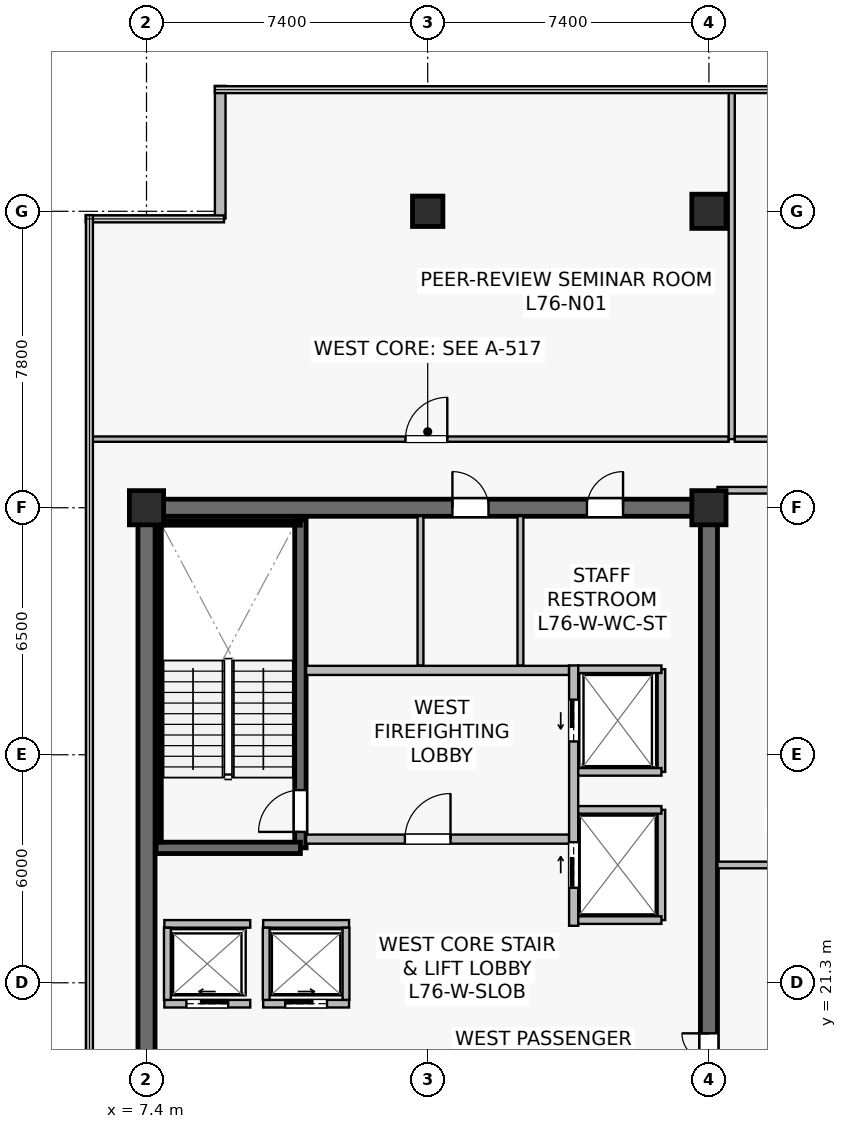
"""IFC4 building model, lengths in metres.
Left out: names, types, materials, properties, quantities, classifications, styles, units other than length and angle.
Written with IfcOpenShell. Run it as: python <this file> out.ifc"""

import sys

from ifc_helpers import new_model, si_unit, direction, frame, frame_2d, origin, origin_2d, place, context, subcontext, project, spatial, rectangle, extrude, source, transform, mapped, element, fill, save


model = new_model("IFC4")
c1 = context("Model", 3, precision=1e-05, world=origin(), true_north=direction((0.0, 1.0)))
c2 = subcontext(c1, "Body", "Model", "MODEL_VIEW")
j1 = project(units=[si_unit("LENGTHUNIT", "METRE"), si_unit("PLANEANGLEUNIT", "RADIAN")], contexts=[c1])
p1 = place(None, origin())
s1 = spatial("IfcSite", under=j1, at=p1, CompositionType="ELEMENT")
p2 = place(p1, origin())
s2 = spatial("IfcBuilding", under=s1, at=p2, CompositionType="ELEMENT")
p3 = place(p2, frame((0.0, 0.0, 318.6)))
s3 = spatial("IfcBuildingStorey", under=s2, at=p3, CompositionType="ELEMENT", Elevation=318.6)
p4 = place(p3, frame((7.175, 33.8, 0.0), z_axis=(0.0, 0.0, 1.0), x_axis=(1.0, 0.0, 0.0)))
e1 = element("IfcWall", 1, at=p4, inside=s3, PredefinedType="SHEAR", context=c2, shape_type="SweptSolid", body=[
    extrude(rectangle(XDim=15.25, YDim=0.45, at=frame_2d((7.625, 0.0))), origin(), (0.0, 0.0, 1.0), 3.9),
])
p5 = place(p4, frame((8.275, 0.0, 0.0)))
e2 = element("IfcOpeningElement", 2, at=p5, cuts=e1, PredefinedType="OPENING", context=c2, shape_type="SweptSolid", body=[
    extrude(rectangle(XDim=0.95, YDim=2.15, at=frame_2d((0.475, 1.075))), frame((0.0, 0.235, 0.0), z_axis=(0.0, -1.0, 0.0), x_axis=(1.0, 0.0, 0.0)), (0.0, 0.0, 1.0), 0.47),
])
p6 = place(p4, frame((11.815, 0.0, 0.0)))
e3 = element("IfcOpeningElement", 3, at=p6, cuts=e1, PredefinedType="OPENING", context=c2, shape_type="SweptSolid", body=[
    extrude(rectangle(XDim=0.95, YDim=2.15, at=frame_2d((0.475, 1.075))), frame((0.0, 0.235, 0.0), z_axis=(0.0, -1.0, 0.0), x_axis=(1.0, 0.0, 0.0)), (0.0, 0.0, 1.0), 0.47),
])
p7 = place(p3, frame((7.4, 15.025, 0.0), z_axis=(0.0, 0.0, 1.0), x_axis=(0.0, 1.0, 0.0)))
e4 = element("IfcWall", 4, at=p7, inside=s3, PredefinedType="SHEAR", context=c2, shape_type="SweptSolid", body=[
    extrude(rectangle(XDim=18.55, YDim=0.45, at=frame_2d((9.275, 0.0))), origin(), (0.0, 0.0, 1.0), 3.9),
])
p8 = place(p3, frame((22.2, 15.025, 0.0), z_axis=(0.0, 0.0, 1.0), x_axis=(0.0, 1.0, 0.0)))
e5 = element("IfcWall", 5, at=p8, inside=s3, PredefinedType="SHEAR", context=c2, shape_type="SweptSolid", body=[
    extrude(rectangle(XDim=18.55, YDim=0.45, at=frame_2d((9.275, 0.0))), origin(), (0.0, 0.0, 1.0), 3.9),
])
p9 = place(p8, frame((3.525, 0.0, 0.0)))
e6 = element("IfcOpeningElement", 6, at=p9, cuts=e5, PredefinedType="OPENING", context=c2, shape_type="SweptSolid", body=[
    extrude(rectangle(XDim=1.42, YDim=2.2, at=frame_2d((0.71, 1.1))), frame((0.0, 0.235, 0.0), z_axis=(0.0, -1.0, 0.0), x_axis=(1.0, 0.0, 0.0)), (0.0, 0.0, 1.0), 0.47),
])
p10 = place(p3, frame((11.45, 24.85, 0.0), z_axis=(0.0, 0.0, 1.0), x_axis=(0.0, 1.0, 0.0)))
e7 = element("IfcWall", 7, at=p10, inside=s3, PredefinedType="SHEAR", context=c2, shape_type="SweptSolid", body=[
    extrude(rectangle(XDim=8.63, YDim=0.3, at=frame_2d((4.315, 0.0))), origin(), (0.0, 0.0, 1.0), 3.9),
])
p11 = place(p10, frame((0.42, 0.0, 0.0)))
e8 = element("IfcOpeningElement", 8, at=p11, cuts=e7, PredefinedType="OPENING", context=c2, shape_type="SweptSolid", body=[
    extrude(rectangle(XDim=1.1, YDim=2.15, at=frame_2d((0.55, 1.075))), frame((0.0, 0.16, 0.0), z_axis=(0.0, -1.0, 0.0), x_axis=(1.0, 0.0, 0.0)), (0.0, 0.0, 1.0), 0.32),
])
p12 = place(p3, frame((7.65, 24.85, 0.0), z_axis=(0.0, 0.0, 1.0), x_axis=(1.0, 0.0, 0.0)))
e9 = element("IfcWall", 9, at=p12, inside=s3, PredefinedType="SHEAR", context=c2, shape_type="SweptSolid", body=[
    extrude(rectangle(XDim=3.8, YDim=0.3, at=frame_2d((1.9, 0.0))), origin(), (0.0, 0.0, 1.0), 3.9),
])
p13 = place(p3, frame((7.73, 33.4, 0.0), z_axis=(0.0, 0.0, 1.0), x_axis=(1.0, 0.0, 0.0)))
e10 = element("IfcWall", 10, at=p13, inside=s3, PredefinedType="SOLIDWALL", context=c2, shape_type="SweptSolid", body=[
    extrude(rectangle(XDim=3.72, YDim=0.12, at=frame_2d((1.86, 0.0))), origin(), (0.0, 0.0, 1.0), 3.9),
])
p14 = place(p3, frame((7.73, 25.0, 0.0), z_axis=(0.0, 0.0, 1.0), x_axis=(0.0, 1.0, 0.0)))
e11 = element("IfcWall", 11, at=p14, inside=s3, PredefinedType="SOLIDWALL", context=c2, shape_type="SweptSolid", body=[
    extrude(rectangle(XDim=8.32, YDim=0.12, at=frame_2d((4.16, 0.0))), origin(), (0.0, 0.0, 1.0), 3.9),
])
m1 = source(origin(), c2, "Body", "SweptSolid", [
    extrude(rectangle(XDim=0.9, YDim=0.9, at=origin_2d()), origin(), (0.0, 0.0, 1.0), 4.2),
])
for number, where, z_axis, x_axis in (
    (12, (7.4, 33.8, 0.0), (0.0, 0.0, 1.0), (1.0, 0.0, 0.0)),
    (13, (22.2, 33.8, 0.0), (0.0, 0.0, 1.0), (1.0, 0.0, 0.0)),
):
    element("IfcColumn", number, at=place(p3, frame(where, z_axis=z_axis, x_axis=x_axis)), inside=s3, PredefinedType="COLUMN", context=c2, shape_type="MappedRepresentation", body=[
        mapped(m1, transform((0.0, 0.0, 0.0), scale=1.0)),
    ])
m2 = source(origin(), c2, "Body", "SweptSolid", [
    extrude(rectangle(XDim=0.8, YDim=0.8, at=origin_2d()), origin(), (0.0, 0.0, 1.0), 4.2),
])
p15 = place(p3, frame((14.8, 41.6, 0.0), z_axis=(0.0, 0.0, 1.0), x_axis=(1.0, 0.0, 0.0)))
e14 = element("IfcColumn", 14, at=p15, inside=s3, PredefinedType="COLUMN", context=c2, shape_type="MappedRepresentation", body=[
    mapped(m2, transform((0.0, 0.0, 0.0), scale=1.0)),
])
p16 = place(p3, frame((22.2, 41.6, 0.0), z_axis=(0.0, 0.0, 1.0), x_axis=(1.0, 0.0, 0.0)))
e15 = element("IfcColumn", 15, at=p16, inside=s3, PredefinedType="COLUMN", context=c2, shape_type="MappedRepresentation", body=[
    mapped(m1, transform((0.0, 0.0, 0.0), scale=1.0)),
])
p17 = place(p3, frame((9.34, 44.9, 0.0), z_axis=(0.0, 0.0, 1.0), x_axis=(0.0, -1.0, 0.0)))
e16 = element("IfcWall", 16, at=p17, inside=s3, PredefinedType="STANDARD", context=c2, shape_type="SweptSolid", body=[
    extrude(rectangle(XDim=3.488, YDim=0.28, at=frame_2d((1.744, 0.0))), origin(), (0.0, 0.0, 1.0), 3.9),
])
p18 = place(p3, frame((11.6, 25.08, 0.0), z_axis=(0.0, 0.0, 1.0), x_axis=(1.0, 0.0, 0.0)))
e17 = element("IfcWall", 17, at=p18, inside=s3, PredefinedType="SOLIDWALL", context=c2, shape_type="SweptSolid", body=[
    extrude(rectangle(XDim=6.92, YDim=0.24, at=frame_2d((3.46, 0.0))), origin(), (0.0, 0.0, 1.0), 3.297),
])
p19 = place(p18, frame((2.6, 0.0, 0.0)))
e18 = element("IfcOpeningElement", 18, at=p19, cuts=e17, PredefinedType="OPENING", context=c2, shape_type="SweptSolid", body=[
    extrude(rectangle(XDim=1.2, YDim=2.16, at=frame_2d((0.6, 1.08))), frame((0.0, 0.13, 0.0), z_axis=(0.0, -1.0, 0.0), x_axis=(1.0, 0.0, 0.0)), (0.0, 0.0, 1.0), 0.26),
])
p20 = place(p3, frame((11.6, 29.52, 0.0), z_axis=(0.0, 0.0, 1.0), x_axis=(1.0, 0.0, 0.0)))
e19 = element("IfcWall", 19, at=p20, inside=s3, PredefinedType="SOLIDWALL", context=c2, shape_type="SweptSolid", body=[
    extrude(rectangle(XDim=6.92, YDim=0.24, at=frame_2d((3.46, 0.0))), origin(), (0.0, 0.0, 1.0), 3.297),
])
p21 = place(p3, frame((18.64, 22.8, 0.0), z_axis=(0.0, 0.0, 1.0), x_axis=(0.0, 1.0, 0.0)))
e20 = element("IfcWall", 20, at=p21, inside=s3, PredefinedType="SOLIDWALL", context=c2, shape_type="SweptSolid", body=[
    extrude(rectangle(XDim=6.85, YDim=0.24, at=frame_2d((3.425, 0.0))), origin(), (0.0, 0.0, 1.0), 3.035),
])
p22 = place(p21, frame((4.85, 0.0, 0.0)))
e21 = element("IfcOpeningElement", 21, at=p22, cuts=e20, PredefinedType="OPENING", context=c2, shape_type="SweptSolid", body=[
    extrude(rectangle(XDim=1.1, YDim=2.22, at=frame_2d((0.55, 1.11))), frame((0.0, 0.13, 0.0), z_axis=(0.0, -1.0, 0.0), x_axis=(1.0, 0.0, 0.0)), (0.0, 0.0, 1.0), 0.26),
])
p23 = place(p21, frame((1.0, 0.0, 0.0)))
e22 = element("IfcOpeningElement", 22, at=p23, cuts=e20, PredefinedType="OPENING", context=c2, shape_type="SweptSolid", body=[
    extrude(rectangle(XDim=1.2, YDim=2.22, at=frame_2d((0.6, 1.11))), frame((0.0, 0.13, 0.0), z_axis=(0.0, -1.0, 0.0), x_axis=(1.0, 0.0, 0.0)), (0.0, 0.0, 1.0), 0.26),
])
p24 = place(p3, frame((7.87, 20.75, 0.0), z_axis=(0.0, 0.0, 1.0), x_axis=(1.0, 0.0, 0.0)))
e23 = element("IfcWall", 23, at=p24, inside=s3, PredefinedType="SOLIDWALL", context=c2, shape_type="SweptSolid", body=[
    extrude(rectangle(XDim=2.26, YDim=0.2, at=frame_2d((1.13, 0.0))), origin(), (0.0, 0.0, 1.0), 3.9),
])
p25 = place(p24, frame((0.58, 0.0, 0.0)))
e24 = element("IfcOpeningElement", 24, at=p25, cuts=e23, PredefinedType="OPENING", context=c2, shape_type="SweptSolid", body=[
    extrude(rectangle(XDim=1.1, YDim=2.22, at=frame_2d((0.55, 1.11))), frame((0.0, 0.11, 0.0), z_axis=(0.0, -1.0, 0.0), x_axis=(1.0, 0.0, 0.0)), (0.0, 0.0, 1.0), 0.22),
])
p26 = place(p3, frame((7.87, 22.85, 0.0), z_axis=(0.0, 0.0, 1.0), x_axis=(1.0, 0.0, 0.0)))
e25 = element("IfcWall", 25, at=p26, inside=s3, PredefinedType="SOLIDWALL", context=c2, shape_type="SweptSolid", body=[
    extrude(rectangle(XDim=2.26, YDim=0.2, at=frame_2d((1.13, 0.0))), origin(), (0.0, 0.0, 1.0), 3.9),
])
p27 = place(p3, frame((7.95, 20.85, 0.0), z_axis=(0.0, 0.0, 1.0), x_axis=(0.0, 1.0, 0.0)))
e26 = element("IfcWall", 26, at=p27, inside=s3, PredefinedType="SOLIDWALL", context=c2, shape_type="SweptSolid", body=[
    extrude(rectangle(XDim=1.9, YDim=0.18, at=frame_2d((0.95, 0.0))), origin(), (0.0, 0.0, 1.0), 3.9),
])
p28 = place(p3, frame((10.47, 20.75, 0.0), z_axis=(0.0, 0.0, 1.0), x_axis=(1.0, 0.0, 0.0)))
e27 = element("IfcWall", 27, at=p28, inside=s3, PredefinedType="SOLIDWALL", context=c2, shape_type="SweptSolid", body=[
    extrude(rectangle(XDim=2.26, YDim=0.2, at=frame_2d((1.13, 0.0))), origin(), (0.0, 0.0, 1.0), 3.9),
])
p29 = place(p28, frame((0.58, 0.0, 0.0)))
e28 = element("IfcOpeningElement", 28, at=p29, cuts=e27, PredefinedType="OPENING", context=c2, shape_type="SweptSolid", body=[
    extrude(rectangle(XDim=1.1, YDim=2.22, at=frame_2d((0.55, 1.11))), frame((0.0, 0.11, 0.0), z_axis=(0.0, -1.0, 0.0), x_axis=(1.0, 0.0, 0.0)), (0.0, 0.0, 1.0), 0.22),
])
p30 = place(p3, frame((10.47, 22.85, 0.0), z_axis=(0.0, 0.0, 1.0), x_axis=(1.0, 0.0, 0.0)))
e29 = element("IfcWall", 29, at=p30, inside=s3, PredefinedType="SOLIDWALL", context=c2, shape_type="SweptSolid", body=[
    extrude(rectangle(XDim=2.26, YDim=0.2, at=frame_2d((1.13, 0.0))), origin(), (0.0, 0.0, 1.0), 3.9),
])
for number, where, z_axis, x_axis in (
    (30, (10.55, 20.85, 0.0), (0.0, 0.0, 1.0), (0.0, 1.0, 0.0)),
    (31, (12.65, 20.85, 0.0), (0.0, 0.0, 1.0), (0.0, 1.0, 0.0)),
):
    element("IfcWall", number, at=place(p3, frame(where, z_axis=z_axis, x_axis=x_axis)), inside=s3, PredefinedType="SOLIDWALL", context=c2, shape_type="SweptSolid", body=[
        extrude(rectangle(XDim=1.9, YDim=0.18, at=frame_2d((0.95, 0.0))), origin(), (0.0, 0.0, 1.0), 3.9),
    ])
p31 = place(p3, frame((20.95, 26.85, 0.0), z_axis=(0.0, 0.0, 1.0), x_axis=(0.0, 1.0, 0.0)))
e32 = element("IfcWall", 32, at=p31, inside=s3, PredefinedType="SOLIDWALL", context=c2, shape_type="SweptSolid", body=[
    extrude(rectangle(XDim=2.7, YDim=0.2, at=frame_2d((1.35, 0.0))), origin(), (0.0, 0.0, 1.0), 3.9),
])
p32 = place(p3, frame((18.76, 29.55, 0.0), z_axis=(0.0, 0.0, 1.0), x_axis=(1.0, 0.0, 0.0)))
e33 = element("IfcWall", 33, at=p32, inside=s3, PredefinedType="SOLIDWALL", context=c2, shape_type="SweptSolid", body=[
    extrude(rectangle(XDim=2.19, YDim=0.2, at=frame_2d((1.095, 0.0))), origin(), (0.0, 0.0, 1.0), 3.9),
])
p33 = place(p3, frame((18.76, 26.85, 0.0), z_axis=(0.0, 0.0, 1.0), x_axis=(1.0, 0.0, 0.0)))
e34 = element("IfcWall", 34, at=p33, inside=s3, PredefinedType="SOLIDWALL", context=c2, shape_type="SweptSolid", body=[
    extrude(rectangle(XDim=2.19, YDim=0.2, at=frame_2d((1.095, 0.0))), origin(), (0.0, 0.0, 1.0), 3.297),
])
p34 = place(p3, frame((20.95, 22.95, 0.0), z_axis=(0.0, 0.0, 1.0), x_axis=(0.0, 1.0, 0.0)))
e35 = element("IfcWall", 35, at=p34, inside=s3, PredefinedType="SOLIDWALL", context=c2, shape_type="SweptSolid", body=[
    extrude(rectangle(XDim=2.9, YDim=0.2, at=frame_2d((1.45, 0.0))), origin(), (0.0, 0.0, 1.0), 3.035),
])
for number, where, z_axis, x_axis in (
    (36, (18.76, 25.85, 0.0), (0.0, 0.0, 1.0), (1.0, 0.0, 0.0)),
    (37, (18.76, 22.95, 0.0), (0.0, 0.0, 1.0), (1.0, 0.0, 0.0)),
):
    element("IfcWall", number, at=place(p3, frame(where, z_axis=z_axis, x_axis=x_axis)), inside=s3, PredefinedType="SOLIDWALL", context=c2, shape_type="SweptSolid", body=[
        extrude(rectangle(XDim=2.19, YDim=0.2, at=frame_2d((1.095, 0.0))), origin(), (0.0, 0.0, 1.0), 3.9),
    ])
p35 = place(p3, frame((14.61, 29.65, 0.0), z_axis=(0.0, 0.0, 1.0), x_axis=(0.0, 1.0, 0.0)))
e38 = element("IfcWall", 38, at=p35, inside=s3, PredefinedType="PLUMBINGWALL", context=c2, shape_type="SweptSolid", body=[
    extrude(rectangle(XDim=3.93, YDim=0.155, at=frame_2d((1.965, 0.0))), origin(), (0.0, 0.0, 1.0), 3.297),
])
p36 = place(p3, frame((17.24, 29.65, 0.0), z_axis=(0.0, 0.0, 1.0), x_axis=(0.0, 1.0, 0.0)))
e39 = element("IfcWall", 39, at=p36, inside=s3, PredefinedType="PLUMBINGWALL", context=c2, shape_type="SweptSolid", body=[
    extrude(rectangle(XDim=3.93, YDim=0.155, at=frame_2d((1.965, 0.0))), origin(), (0.0, 0.0, 1.0), 3.9),
])
p37 = place(p3, frame((22.425, 34.26, 0.0), z_axis=(0.0, 0.0, 1.0), x_axis=(1.0, 0.0, 0.0)))
e40 = element("IfcWall", 40, at=p37, inside=s3, PredefinedType="PARTITIONING", context=c2, shape_type="SweptSolid", body=[
    extrude(rectangle(XDim=4.075, YDim=0.175, at=frame_2d((2.038, 0.0))), origin(), (0.0, 0.0, 1.0), 3.635),
])
p38 = place(p3, frame((22.425, 24.4, 0.0), z_axis=(0.0, 0.0, 1.0), x_axis=(1.0, 0.0, 0.0)))
e41 = element("IfcWall", 41, at=p38, inside=s3, PredefinedType="PARTITIONING", context=c2, shape_type="SweptSolid", body=[
    extrude(rectangle(XDim=4.075, YDim=0.175, at=frame_2d((2.038, 0.0))), origin(), (0.0, 0.0, 1.0), 3.9),
])
p39 = place(p38, frame((1.35, 0.0, 0.0)))
e42 = element("IfcOpeningElement", 42, at=p39, cuts=e41, PredefinedType="OPENING", context=c2, shape_type="SweptSolid", body=[
    extrude(rectangle(XDim=0.95, YDim=2.15, at=frame_2d((0.475, 1.075))), frame((0.0, 0.098, 0.0), z_axis=(0.0, -1.0, 0.0), x_axis=(1.0, 0.0, 0.0)), (0.0, 0.0, 1.0), 0.195),
])
p40 = place(p3, frame((5.91, 35.605, 0.0), z_axis=(0.0, 0.0, 1.0), x_axis=(1.0, 0.0, 0.0)))
e43 = element("IfcWall", 43, at=p40, inside=s3, PredefinedType="PARTITIONING", context=c2, shape_type="SweptSolid", body=[
    extrude(rectangle(XDim=16.81, YDim=0.14, at=frame_2d((8.405, 0.0))), origin(), (0.0, 0.0, 1.0), 3.297),
])
p41 = place(p40, frame((8.305, 0.0, 0.0)))
e44 = element("IfcOpeningElement", 44, at=p41, cuts=e43, PredefinedType="OPENING", context=c2, shape_type="SweptSolid", body=[
    extrude(rectangle(XDim=1.1, YDim=2.18, at=frame_2d((0.55, 1.09))), frame((0.0, 0.08, 0.0), z_axis=(0.0, -1.0, 0.0), x_axis=(1.0, 0.0, 0.0)), (0.0, 0.0, 1.0), 0.16),
])
p42 = place(p3, frame((22.8, 35.605, 0.0), z_axis=(0.0, 0.0, 1.0), x_axis=(0.0, 1.0, 0.0)))
e45 = element("IfcWall", 45, at=p42, inside=s3, PredefinedType="PARTITIONING", context=c2, shape_type="SweptSolid", body=[
    extrude(rectangle(XDim=9.185, YDim=0.16, at=frame_2d((4.593, 0.0))), origin(), (0.0, 0.0, 1.0), 3.235),
])
p43 = place(p3, frame((22.88, 35.605, 0.0), z_axis=(0.0, 0.0, 1.0), x_axis=(1.0, 0.0, 0.0)))
e46 = element("IfcWall", 46, at=p43, inside=s3, PredefinedType="PARTITIONING", context=c2, shape_type="SweptSolid", body=[
    extrude(rectangle(XDim=22.84, YDim=0.14, at=frame_2d((11.42, 0.0))), origin(), (0.0, 0.0, 1.0), 3.297),
])
p44 = place(p43, frame((8.976, 0.0, 0.0)))
e47 = element("IfcOpeningElement", 47, at=p44, cuts=e46, PredefinedType="OPENING", context=c2, shape_type="SweptSolid", body=[
    extrude(rectangle(XDim=1.1, YDim=2.18, at=frame_2d((0.55, 1.09))), frame((0.0, 0.08, 0.0), z_axis=(0.0, -1.0, 0.0), x_axis=(1.0, 0.0, 0.0)), (0.0, 0.0, 1.0), 0.16),
])
m3 = source(origin(), c2, "Body", "SweptSolid", [
    extrude(rectangle(XDim=1.1, YDim=2.15, at=frame_2d((0.55, 1.075))), frame((0.0, 0.025, 0.0), z_axis=(0.0, -1.0, 0.0), x_axis=(1.0, 0.0, 0.0)), (0.0, 0.0, 1.0), 0.05),
])
p45 = place(p11, origin())
e48 = element("IfcDoor", 48, at=p45, inside=s3, OperationType="SINGLE_SWING_LEFT", PredefinedType="DOOR", context=c2, shape_type="MappedRepresentation", body=[
    mapped(m3, transform((0.0, 0.0, 0.0), scale=1.0)),
])
fill(e8, e48)
m4 = source(origin(), c2, "Body", "SweptSolid", [
    extrude(rectangle(XDim=1.2, YDim=2.16, at=frame_2d((0.6, 1.08))), frame((0.0, 0.025, 0.0), z_axis=(0.0, -1.0, 0.0), x_axis=(1.0, 0.0, 0.0)), (0.0, 0.0, 1.0), 0.05),
])
p46 = place(p19, origin())
e49 = element("IfcDoor", 49, at=p46, inside=s3, OperationType="SINGLE_SWING_RIGHT", PredefinedType="DOOR", context=c2, shape_type="MappedRepresentation", body=[
    mapped(m4, transform((0.0, 0.0, 0.0), scale=1.0)),
])
fill(e18, e49)
m5 = source(origin(), c2, "Body", "SweptSolid", [
    extrude(rectangle(XDim=1.1, YDim=2.22, at=frame_2d((0.55, 1.11))), frame((0.0, 0.025, 0.0), z_axis=(0.0, -1.0, 0.0), x_axis=(1.0, 0.0, 0.0)), (0.0, 0.0, 1.0), 0.05),
])
p47 = place(p25, origin())
e50 = element("IfcDoor", 50, at=p47, inside=s3, OperationType="SLIDING_TO_LEFT", PredefinedType="USERDEFINED", context=c2, shape_type="MappedRepresentation", body=[
    mapped(m5, transform((0.0, 0.0, 0.0), scale=1.0)),
])
fill(e24, e50)
p48 = place(p29, origin())
e51 = element("IfcDoor", 51, at=p48, inside=s3, OperationType="SLIDING_TO_RIGHT", PredefinedType="USERDEFINED", context=c2, shape_type="MappedRepresentation", body=[
    mapped(m5, transform((0.0, 0.0, 0.0), scale=1.0)),
])
fill(e28, e51)
p49 = place(p22, origin())
e52 = element("IfcDoor", 52, at=p49, inside=s3, OperationType="SLIDING_TO_LEFT", PredefinedType="USERDEFINED", context=c2, shape_type="MappedRepresentation", body=[
    mapped(m5, transform((0.0, 0.0, 0.0), scale=1.0)),
])
fill(e21, e52)
m6 = source(origin(), c2, "Body", "SweptSolid", [
    extrude(rectangle(XDim=1.2, YDim=2.22, at=frame_2d((0.6, 1.11))), frame((0.0, 0.025, 0.0), z_axis=(0.0, -1.0, 0.0), x_axis=(1.0, 0.0, 0.0)), (0.0, 0.0, 1.0), 0.05),
])
p50 = place(p23, origin())
e53 = element("IfcDoor", 53, at=p50, inside=s3, OperationType="SLIDING_TO_RIGHT", PredefinedType="USERDEFINED", context=c2, shape_type="MappedRepresentation", body=[
    mapped(m6, transform((0.0, 0.0, 0.0), scale=1.0)),
])
fill(e22, e53)
m7 = source(origin(), c2, "Body", "SweptSolid", [
    extrude(rectangle(XDim=1.42, YDim=2.2, at=frame_2d((0.71, 1.1))), frame((0.0, 0.025, 0.0), z_axis=(0.0, -1.0, 0.0), x_axis=(1.0, 0.0, 0.0)), (0.0, 0.0, 1.0), 0.05),
])
p51 = place(p9, origin())
e54 = element("IfcDoor", 54, at=p51, inside=s3, OperationType="DOUBLE_DOOR_SINGLE_SWING", PredefinedType="DOOR", context=c2, shape_type="MappedRepresentation", body=[
    mapped(m7, transform((0.0, 0.0, 0.0), scale=1.0)),
])
fill(e6, e54)
m8 = source(origin(), c2, "Body", "SweptSolid", [
    extrude(rectangle(XDim=0.95, YDim=2.15, at=frame_2d((0.475, 1.075))), frame((0.0, 0.025, 0.0), z_axis=(0.0, -1.0, 0.0), x_axis=(1.0, 0.0, 0.0)), (0.0, 0.0, 1.0), 0.05),
])
p52 = place(p5, origin())
e55 = element("IfcDoor", 55, at=p52, inside=s3, OperationType="SINGLE_SWING_LEFT", PredefinedType="DOOR", context=c2, shape_type="MappedRepresentation", body=[
    mapped(m8, transform((0.0, 0.0, 0.0), scale=1.0)),
])
fill(e2, e55)
p53 = place(p6, origin())
e56 = element("IfcDoor", 56, at=p53, inside=s3, OperationType="SINGLE_SWING_RIGHT", PredefinedType="DOOR", context=c2, shape_type="MappedRepresentation", body=[
    mapped(m8, transform((0.0, 0.0, 0.0), scale=1.0)),
])
fill(e3, e56)
m9 = source(origin(), c2, "Body", "SweptSolid", [
    extrude(rectangle(XDim=1.1, YDim=2.18, at=frame_2d((0.55, 1.09))), frame((0.0, 0.025, 0.0), z_axis=(0.0, -1.0, 0.0), x_axis=(1.0, 0.0, 0.0)), (0.0, 0.0, 1.0), 0.05),
])
p54 = place(p41, origin())
e57 = element("IfcDoor", 57, at=p54, inside=s3, OperationType="SINGLE_SWING_RIGHT", PredefinedType="DOOR", context=c2, shape_type="MappedRepresentation", body=[
    mapped(m9, transform((0.0, 0.0, 0.0), scale=1.0)),
])
fill(e44, e57)
save(model, sys.argv[1])
